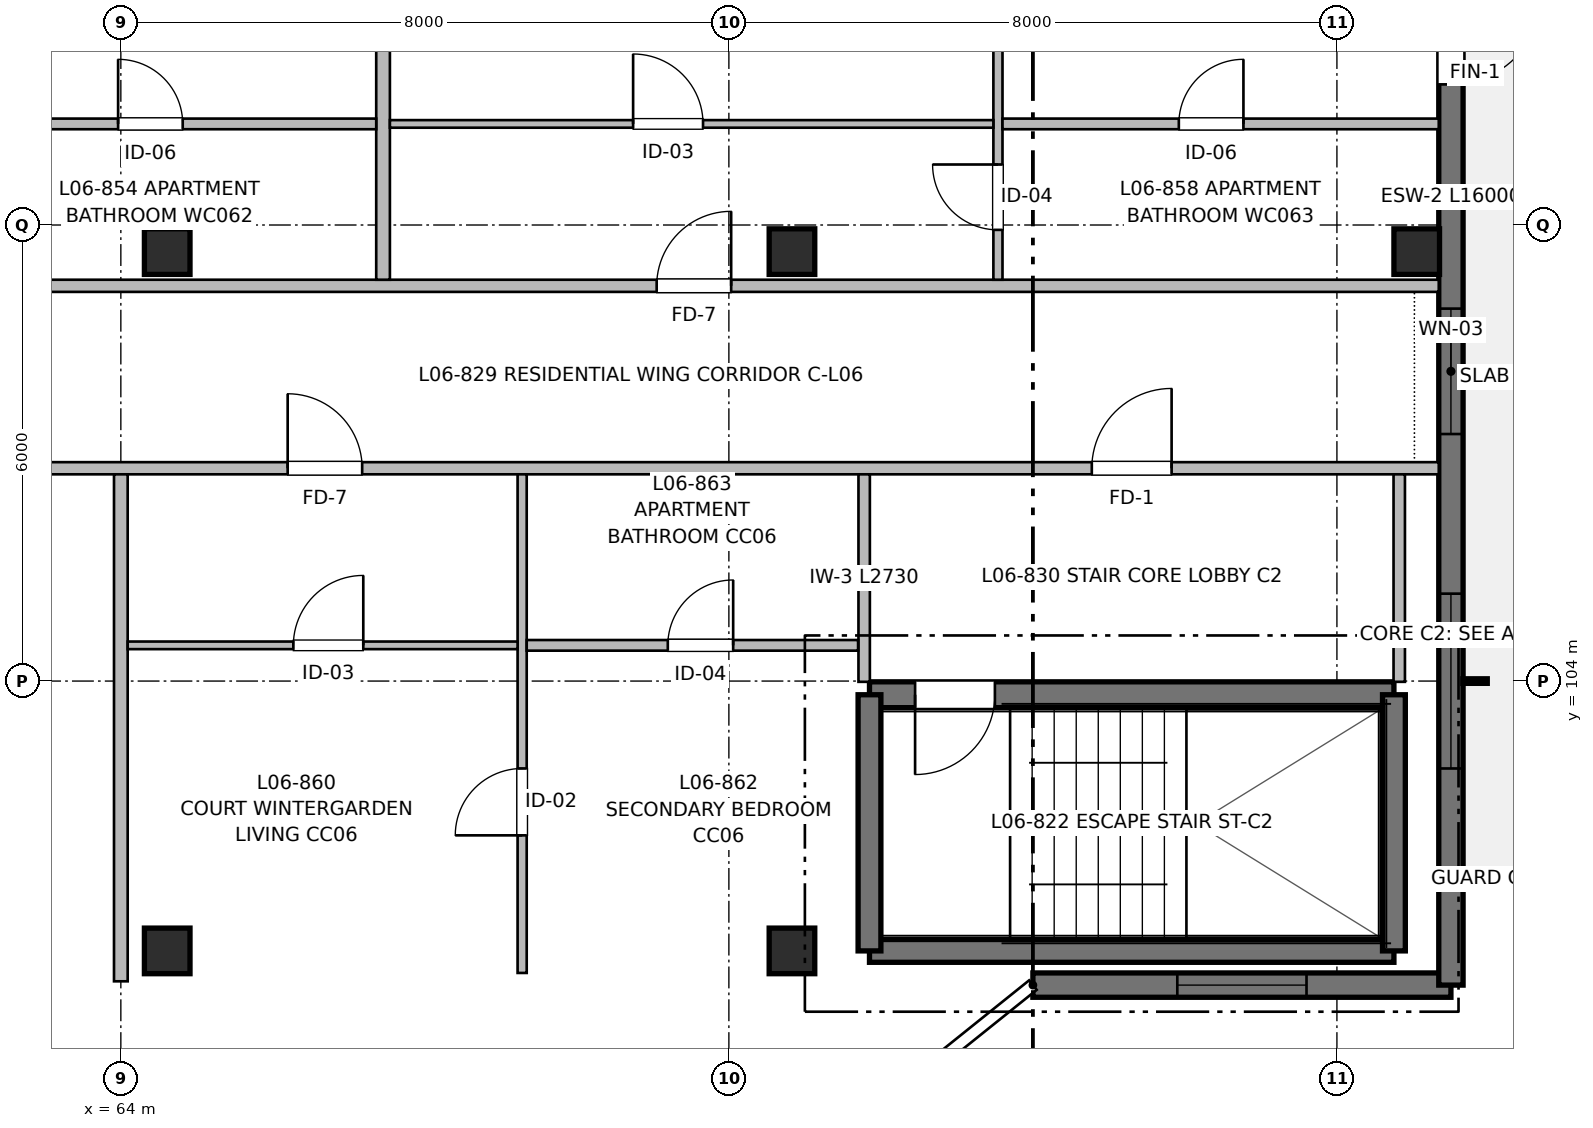
"""IFC4 building model, lengths in metres.
Left out: names, types, materials, properties, quantities, classifications, styles, units other than length and angle.
Written with IfcOpenShell. Run it as: python <this file> out.ifc"""

import sys

from ifc_helpers import new_model, si_unit, direction, frame, frame_2d, origin, origin_2d, place, context, subcontext, project, spatial, rectangle, extrude, element, fill, save


model = new_model("IFC4")
c1 = context("Model", 3, precision=1e-05, world=origin(), true_north=direction((0.0, 1.0)))
c2 = subcontext(c1, "Body", "Model", "MODEL_VIEW")
j1 = project(units=[si_unit("LENGTHUNIT", "METRE"), si_unit("PLANEANGLEUNIT", "RADIAN")], contexts=[c1])
p1 = place(None, origin())
s1 = spatial("IfcSite", under=j1, at=p1, CompositionType="ELEMENT")
p2 = place(p1, origin())
s2 = spatial("IfcBuilding", under=s1, at=p2, CompositionType="ELEMENT")
p3 = place(p2, frame((0.0, 0.0, 20.16)))
s3 = spatial("IfcBuildingStorey", under=s2, at=p3, CompositionType="ELEMENT", Elevation=20.16)
for number, where, z_axis, x_axis in (
    (1, (64.61, 100.45, 0.0), (0.0, 0.0, 1.0), (1.0, 0.0, 0.0)),
    (2, (64.61, 109.65, 0.0), (0.0, 0.0, 1.0), (1.0, 0.0, 0.0)),
    (3, (72.83, 100.45, 0.0), (0.0, 0.0, 1.0), (1.0, 0.0, 0.0)),
    (4, (72.83, 109.65, 0.0), (0.0, 0.0, 1.0), (1.0, 0.0, 0.0)),
    (5, (81.05, 109.65, 0.0), (0.0, 0.0, 1.0), (1.0, 0.0, 0.0)),
):
    element("IfcColumn", number, at=place(p3, frame(where, z_axis=z_axis, x_axis=x_axis)), inside=s3, PredefinedType="COLUMN", context=c2, shape_type="SweptSolid", body=[
        extrude(rectangle(XDim=0.6, YDim=0.6, at=origin_2d()), origin(), (0.0, 0.0, 1.0), 3.2),
    ])
p4 = place(p3, frame((73.85, 100.45, 0.0), z_axis=(0.0, 0.0, 1.0), x_axis=(1.0, 0.0, 0.0)))
e6 = element("IfcWall", 6, at=p4, inside=s3, PredefinedType="SHEAR", context=c2, shape_type="SweptSolid", body=[
    extrude(rectangle(XDim=6.9, YDim=0.3, at=frame_2d((3.45, 0.0))), origin(), (0.0, 0.0, 1.0), 3.2),
])
p5 = place(p3, frame((80.75, 103.82, 0.0), z_axis=(0.0, 0.0, 1.0), x_axis=(-1.0, 0.0, 0.0)))
e7 = element("IfcWall", 7, at=p5, inside=s3, PredefinedType="SHEAR", context=c2, shape_type="SweptSolid", body=[
    extrude(rectangle(XDim=6.9, YDim=0.34, at=frame_2d((3.45, 0.0))), origin(), (0.0, 0.0, 1.0), 3.2),
])
p6 = place(p5, frame((5.25, 0.0, 0.0)))
e8 = element("IfcOpeningElement", 8, at=p6, cuts=e7, PredefinedType="OPENING", context=c2, shape_type="SweptSolid", body=[
    extrude(rectangle(XDim=1.05, YDim=2.15, at=frame_2d((0.525, 1.075))), frame((0.0, 0.18, 0.0), z_axis=(0.0, -1.0, 0.0), x_axis=(1.0, 0.0, 0.0)), (0.0, 0.0, 1.0), 0.36),
])
for number, where, z_axis, x_axis in (
    (9, (73.85, 103.82, 0.0), (0.0, 0.0, 1.0), (0.0, -1.0, 0.0)),
    (10, (80.75, 100.45, 0.0), (0.0, 0.0, 1.0), (0.0, 1.0, 0.0)),
):
    element("IfcWall", number, at=place(p3, frame(where, z_axis=z_axis, x_axis=x_axis)), inside=s3, PredefinedType="SHEAR", context=c2, shape_type="SweptSolid", body=[
        extrude(rectangle(XDim=3.37, YDim=0.3, at=frame_2d((1.685, 0.0))), origin(), (0.0, 0.0, 1.0), 3.2),
    ])
p7 = place(p3, frame((81.5, 100.0, 0.0), z_axis=(0.0, 0.0, 1.0), x_axis=(-1.0, 0.0, 0.0)))
e11 = element("IfcWall", 11, at=p7, inside=s3, PredefinedType="SHEAR", context=c2, shape_type="SweptSolid", body=[
    extrude(rectangle(XDim=5.5, YDim=0.32, at=frame_2d((2.75, 0.0))), origin(), (0.0, 0.0, 1.0), 2.98),
])
p8 = place(p7, frame((1.9, 0.0, 0.72)))
e12 = element("IfcOpeningElement", 12, at=p8, cuts=e11, PredefinedType="OPENING", context=c2, shape_type="SweptSolid", body=[
    extrude(rectangle(XDim=1.7, YDim=1.5, at=frame_2d((0.85, 0.75))), frame((0.0, 0.17, 0.0), z_axis=(0.0, -1.0, 0.0), x_axis=(1.0, 0.0, 0.0)), (0.0, 0.0, 1.0), 0.34),
])
p9 = place(p3, frame((81.5, 116.0, 0.0), z_axis=(0.0, 0.0, 1.0), x_axis=(0.0, -1.0, 0.0)))
e13 = element("IfcWall", 13, at=p9, inside=s3, PredefinedType="SHEAR", context=c2, shape_type="SweptSolid", body=[
    extrude(rectangle(XDim=16.0, YDim=0.32, at=frame_2d((8.0, 0.0))), origin(), (0.0, 0.0, 1.0), 2.98),
])
p10 = place(p9, frame((2.95, 0.0, 0.0)))
e14 = element("IfcOpeningElement", 14, at=p10, cuts=e13, PredefinedType="OPENING", context=c2, shape_type="SweptSolid", body=[
    extrude(rectangle(XDim=1.2, YDim=2.2, at=frame_2d((0.6, 1.1))), frame((0.0, 0.17, 0.0), z_axis=(0.0, -1.0, 0.0), x_axis=(1.0, 0.0, 0.0)), (0.0, 0.0, 1.0), 0.34),
])
p11 = place(p9, frame((7.1, 0.0, 0.77)))
e15 = element("IfcOpeningElement", 15, at=p11, cuts=e13, PredefinedType="OPENING", context=c2, shape_type="SweptSolid", body=[
    extrude(rectangle(XDim=1.65, YDim=1.45, at=frame_2d((0.825, 0.725))), frame((0.0, 0.17, 0.0), z_axis=(0.0, -1.0, 0.0), x_axis=(1.0, 0.0, 0.0)), (0.0, 0.0, 1.0), 0.34),
])
p12 = place(p9, frame((10.85, 0.0, 0.57)))
e16 = element("IfcOpeningElement", 16, at=p12, cuts=e13, PredefinedType="OPENING", context=c2, shape_type="SweptSolid", body=[
    extrude(rectangle(XDim=2.3, YDim=1.65, at=frame_2d((1.15, 0.825))), frame((0.0, 0.17, 0.0), z_axis=(0.0, -1.0, 0.0), x_axis=(1.0, 0.0, 0.0)), (0.0, 0.0, 1.0), 0.34),
])
p13 = place(p3, frame((57.2, 106.8, 0.0), z_axis=(0.0, 0.0, 1.0), x_axis=(1.0, 0.0, 0.0)))
e17 = element("IfcWall", 17, at=p13, inside=s3, PredefinedType="PARTITIONING", context=c2, shape_type="SweptSolid", body=[
    extrude(rectangle(XDim=24.14, YDim=0.16, at=frame_2d((12.07, 0.0))), origin(), (0.0, 0.0, 1.0), 2.935),
])
p14 = place(p13, frame((19.575, 0.0, 0.0)))
e18 = element("IfcOpeningElement", 18, at=p14, cuts=e17, PredefinedType="OPENING", context=c2, shape_type="SweptSolid", body=[
    extrude(rectangle(XDim=1.05, YDim=2.15, at=frame_2d((0.525, 1.075))), frame((0.0, 0.09, 0.0), z_axis=(0.0, -1.0, 0.0), x_axis=(1.0, 0.0, 0.0)), (0.0, 0.0, 1.0), 0.18),
])
p15 = place(p13, frame((8.995, 0.0, 0.0)))
e19 = element("IfcOpeningElement", 19, at=p15, cuts=e17, PredefinedType="OPENING", context=c2, shape_type="SweptSolid", body=[
    extrude(rectangle(XDim=0.98, YDim=2.15, at=frame_2d((0.49, 1.075))), frame((0.0, 0.09, 0.0), z_axis=(0.0, -1.0, 0.0), x_axis=(1.0, 0.0, 0.0)), (0.0, 0.0, 1.0), 0.18),
])
p16 = place(p3, frame((39.66, 109.2, 0.0), z_axis=(0.0, 0.0, 1.0), x_axis=(1.0, 0.0, 0.0)))
e20 = element("IfcWall", 20, at=p16, inside=s3, PredefinedType="PARTITIONING", context=c2, shape_type="SweptSolid", body=[
    extrude(rectangle(XDim=41.68, YDim=0.16, at=frame_2d((20.84, 0.0))), origin(), (0.0, 0.0, 1.0), 2.935),
])
p17 = place(p16, frame((3.51, 0.0, 0.0)))
e21 = element("IfcOpeningElement", 21, at=p17, cuts=e20, PredefinedType="OPENING", context=c2, shape_type="SweptSolid", body=[
    extrude(rectangle(XDim=0.98, YDim=2.15, at=frame_2d((0.49, 1.075))), frame((0.0, 0.09, 0.0), z_axis=(0.0, -1.0, 0.0), x_axis=(1.0, 0.0, 0.0)), (0.0, 0.0, 1.0), 0.18),
])
p18 = place(p16, frame((17.47, 0.0, 0.0)))
e22 = element("IfcOpeningElement", 22, at=p18, cuts=e20, PredefinedType="OPENING", context=c2, shape_type="SweptSolid", body=[
    extrude(rectangle(XDim=0.98, YDim=2.15, at=frame_2d((0.49, 1.075))), frame((0.0, 0.09, 0.0), z_axis=(0.0, -1.0, 0.0), x_axis=(1.0, 0.0, 0.0)), (0.0, 0.0, 1.0), 0.18),
])
p19 = place(p16, frame((31.39, 0.0, 0.0)))
e23 = element("IfcOpeningElement", 23, at=p19, cuts=e20, PredefinedType="OPENING", context=c2, shape_type="SweptSolid", body=[
    extrude(rectangle(XDim=0.98, YDim=2.15, at=frame_2d((0.49, 1.075))), frame((0.0, 0.09, 0.0), z_axis=(0.0, -1.0, 0.0), x_axis=(1.0, 0.0, 0.0)), (0.0, 0.0, 1.0), 0.18),
])
p20 = place(p3, frame((64.0, 100.05, 0.0), z_axis=(0.0, 0.0, 1.0), x_axis=(0.0, 1.0, 0.0)))
e24 = element("IfcWall", 24, at=p20, inside=s3, PredefinedType="PARTITIONING", context=c2, shape_type="SweptSolid", body=[
    extrude(rectangle(XDim=6.67, YDim=0.18, at=frame_2d((3.335, 0.0))), origin(), (0.0, 0.0, 1.0), 2.935),
])
for number, where, z_axis, x_axis in (
    (25, (73.78, 103.99, 0.0), (0.0, 0.0, 1.0), (0.0, 1.0, 0.0)),
    (26, (80.82, 103.99, 0.0), (0.0, 0.0, 1.0), (0.0, 1.0, 0.0)),
):
    element("IfcWall", number, at=place(p3, frame(where, z_axis=z_axis, x_axis=x_axis)), inside=s3, PredefinedType="PARTITIONING", context=c2, shape_type="SweptSolid", body=[
        extrude(rectangle(XDim=2.73, YDim=0.15, at=frame_2d((1.365, 0.0))), origin(), (0.0, 0.0, 1.0), 2.935),
    ])
p21 = place(p3, frame((67.45, 109.28, 0.0), z_axis=(0.0, 0.0, 1.0), x_axis=(0.0, 1.0, 0.0)))
e27 = element("IfcWall", 27, at=p21, inside=s3, PredefinedType="PARTITIONING", context=c2, shape_type="SweptSolid", body=[
    extrude(rectangle(XDim=6.6, YDim=0.18, at=frame_2d((3.3, 0.0))), origin(), (0.0, 0.0, 1.0), 2.935),
])
p22 = place(p3, frame((61.66, 111.33, 0.0), z_axis=(0.0, 0.0, 1.0), x_axis=(1.0, 0.0, 0.0)))
e28 = element("IfcWall", 28, at=p22, inside=s3, PredefinedType="PARTITIONING", context=c2, shape_type="SweptSolid", body=[
    extrude(rectangle(XDim=5.7, YDim=0.14, at=frame_2d((2.85, 0.0))), origin(), (0.0, 0.0, 1.0), 2.935),
])
p23 = place(p22, frame((2.304, 0.0, 0.0)))
e29 = element("IfcOpeningElement", 29, at=p23, cuts=e28, PredefinedType="OPENING", context=c2, shape_type="SweptSolid", body=[
    extrude(rectangle(XDim=0.85, YDim=2.05, at=frame_2d((0.425, 1.025))), frame((0.0, 0.08, 0.0), z_axis=(0.0, -1.0, 0.0), x_axis=(1.0, 0.0, 0.0)), (0.0, 0.0, 1.0), 0.16),
])
p24 = place(p3, frame((75.54, 109.28, 0.0), z_axis=(0.0, 0.0, 1.0), x_axis=(0.0, 1.0, 0.0)))
e30 = element("IfcWall", 30, at=p24, inside=s3, PredefinedType="PARTITIONING", context=c2, shape_type="SweptSolid", body=[
    extrude(rectangle(XDim=6.6, YDim=0.12, at=frame_2d((3.3, 0.0))), origin(), (0.0, 0.0, 1.0), 2.935),
])
p25 = place(p24, frame((0.656, 0.0, 0.0)))
e31 = element("IfcOpeningElement", 31, at=p25, cuts=e30, PredefinedType="OPENING", context=c2, shape_type="SweptSolid", body=[
    extrude(rectangle(XDim=0.86, YDim=2.1, at=frame_2d((0.43, 1.05))), frame((0.0, 0.07, 0.0), z_axis=(0.0, -1.0, 0.0), x_axis=(1.0, 0.0, 0.0)), (0.0, 0.0, 1.0), 0.14),
])
p26 = place(p24, frame((4.097, 0.0, 0.0)))
e32 = element("IfcOpeningElement", 32, at=p26, cuts=e30, PredefinedType="OPENING", context=c2, shape_type="SweptSolid", body=[
    extrude(rectangle(XDim=0.9, YDim=2.1, at=frame_2d((0.45, 1.05))), frame((0.0, 0.07, 0.0), z_axis=(0.0, -1.0, 0.0), x_axis=(1.0, 0.0, 0.0)), (0.0, 0.0, 1.0), 0.14),
])
p27 = place(p3, frame((75.6, 111.33, 0.0), z_axis=(0.0, 0.0, 1.0), x_axis=(1.0, 0.0, 0.0)))
e33 = element("IfcWall", 33, at=p27, inside=s3, PredefinedType="PARTITIONING", context=c2, shape_type="SweptSolid", body=[
    extrude(rectangle(XDim=5.74, YDim=0.14, at=frame_2d((2.87, 0.0))), origin(), (0.0, 0.0, 1.0), 2.935),
])
p28 = place(p27, frame((2.32, 0.0, 0.0)))
e34 = element("IfcOpeningElement", 34, at=p28, cuts=e33, PredefinedType="OPENING", context=c2, shape_type="SweptSolid", body=[
    extrude(rectangle(XDim=0.85, YDim=2.05, at=frame_2d((0.425, 1.025))), frame((0.0, 0.08, 0.0), z_axis=(0.0, -1.0, 0.0), x_axis=(1.0, 0.0, 0.0)), (0.0, 0.0, 1.0), 0.16),
])
p29 = place(p3, frame((67.54, 111.33, 0.0), z_axis=(0.0, 0.0, 1.0), x_axis=(1.0, 0.0, 0.0)))
e35 = element("IfcWall", 35, at=p29, inside=s3, PredefinedType="PARTITIONING", context=c2, shape_type="SweptSolid", body=[
    extrude(rectangle(XDim=7.94, YDim=0.1, at=frame_2d((3.97, 0.0))), origin(), (0.0, 0.0, 1.0), 2.935),
])
p30 = place(p29, frame((3.2, 0.0, 0.0)))
e36 = element("IfcOpeningElement", 36, at=p30, cuts=e35, PredefinedType="OPENING", context=c2, shape_type="SweptSolid", body=[
    extrude(rectangle(XDim=0.92, YDim=2.1, at=frame_2d((0.46, 1.05))), frame((0.0, 0.06, 0.0), z_axis=(0.0, -1.0, 0.0), x_axis=(1.0, 0.0, 0.0)), (0.0, 0.0, 1.0), 0.12),
])
p31 = place(p3, frame((69.28, 100.16, 0.0), z_axis=(0.0, 0.0, 1.0), x_axis=(0.0, 1.0, 0.0)))
e37 = element("IfcWall", 37, at=p31, inside=s3, PredefinedType="PARTITIONING", context=c2, shape_type="SweptSolid", body=[
    extrude(rectangle(XDim=6.56, YDim=0.12, at=frame_2d((3.28, 0.0))), origin(), (0.0, 0.0, 1.0), 2.935),
])
p32 = place(p31, frame((1.81, 0.0, 0.0)))
e38 = element("IfcOpeningElement", 38, at=p32, cuts=e37, PredefinedType="OPENING", context=c2, shape_type="SweptSolid", body=[
    extrude(rectangle(XDim=0.88, YDim=2.1, at=frame_2d((0.44, 1.05))), frame((0.0, 0.07, 0.0), z_axis=(0.0, -1.0, 0.0), x_axis=(1.0, 0.0, 0.0)), (0.0, 0.0, 1.0), 0.14),
])
p33 = place(p3, frame((69.34, 104.47, 0.0), z_axis=(0.0, 0.0, 1.0), x_axis=(1.0, 0.0, 0.0)))
e39 = element("IfcWall", 39, at=p33, inside=s3, PredefinedType="PARTITIONING", context=c2, shape_type="SweptSolid", body=[
    extrude(rectangle(XDim=4.36, YDim=0.14, at=frame_2d((2.18, 0.0))), origin(), (0.0, 0.0, 1.0), 2.935),
])
p34 = place(p33, frame((1.856, 0.0, 0.0)))
e40 = element("IfcOpeningElement", 40, at=p34, cuts=e39, PredefinedType="OPENING", context=c2, shape_type="SweptSolid", body=[
    extrude(rectangle(XDim=0.86, YDim=2.1, at=frame_2d((0.43, 1.05))), frame((0.0, 0.08, 0.0), z_axis=(0.0, -1.0, 0.0), x_axis=(1.0, 0.0, 0.0)), (0.0, 0.0, 1.0), 0.16),
])
p35 = place(p3, frame((64.09, 104.47, 0.0), z_axis=(0.0, 0.0, 1.0), x_axis=(1.0, 0.0, 0.0)))
e41 = element("IfcWall", 41, at=p35, inside=s3, PredefinedType="PARTITIONING", context=c2, shape_type="SweptSolid", body=[
    extrude(rectangle(XDim=5.13, YDim=0.1, at=frame_2d((2.565, 0.0))), origin(), (0.0, 0.0, 1.0), 2.935),
])
p36 = place(p35, frame((2.18, 0.0, 0.0)))
e42 = element("IfcOpeningElement", 42, at=p36, cuts=e41, PredefinedType="OPENING", context=c2, shape_type="SweptSolid", body=[
    extrude(rectangle(XDim=0.92, YDim=2.1, at=frame_2d((0.46, 1.05))), frame((0.0, 0.06, 0.0), z_axis=(0.0, -1.0, 0.0), x_axis=(1.0, 0.0, 0.0)), (0.0, 0.0, 1.0), 0.12),
])
p37 = place(p6, origin())
e43 = element("IfcDoor", 43, at=p37, inside=s3, OperationType="SINGLE_SWING_RIGHT", PredefinedType="DOOR", context=c2, shape_type="SweptSolid", body=[
    extrude(rectangle(XDim=1.05, YDim=2.15, at=frame_2d((0.525, 1.075))), frame((0.0, 0.025, 0.0), z_axis=(0.0, -1.0, 0.0), x_axis=(1.0, 0.0, 0.0)), (0.0, 0.0, 1.0), 0.05),
])
fill(e8, e43)
p38 = place(p8, origin())
e44 = element("IfcWindow", 44, at=p38, inside=s3, PartitioningType="SINGLE_PANEL", PredefinedType="WINDOW", context=c2, shape_type="SweptSolid", body=[
    extrude(rectangle(XDim=1.7, YDim=1.5, at=frame_2d((0.85, 0.75))), frame((0.0, 0.03, 0.0), z_axis=(0.0, -1.0, 0.0), x_axis=(1.0, 0.0, 0.0)), (0.0, 0.0, 1.0), 0.06),
])
fill(e12, e44)
p39 = place(p10, origin())
e45 = element("IfcDoor", 45, at=p39, inside=s3, OperationType="SINGLE_SWING_LEFT", PredefinedType="DOOR", context=c2, shape_type="SweptSolid", body=[
    extrude(rectangle(XDim=1.2, YDim=2.2, at=frame_2d((0.6, 1.1))), frame((0.0, 0.025, 0.0), z_axis=(0.0, -1.0, 0.0), x_axis=(1.0, 0.0, 0.0)), (0.0, 0.0, 1.0), 0.05),
])
fill(e14, e45)
p40 = place(p11, origin())
e46 = element("IfcWindow", 46, at=p40, inside=s3, PartitioningType="SINGLE_PANEL", PredefinedType="WINDOW", context=c2, shape_type="SweptSolid", body=[
    extrude(rectangle(XDim=1.65, YDim=1.45, at=frame_2d((0.825, 0.725))), frame((0.0, 0.03, 0.0), z_axis=(0.0, -1.0, 0.0), x_axis=(1.0, 0.0, 0.0)), (0.0, 0.0, 1.0), 0.06),
])
fill(e15, e46)
p41 = place(p12, origin())
e47 = element("IfcWindow", 47, at=p41, inside=s3, PartitioningType="SINGLE_PANEL", PredefinedType="WINDOW", context=c2, shape_type="SweptSolid", body=[
    extrude(rectangle(XDim=2.3, YDim=1.65, at=frame_2d((1.15, 0.825))), frame((0.0, 0.03, 0.0), z_axis=(0.0, -1.0, 0.0), x_axis=(1.0, 0.0, 0.0)), (0.0, 0.0, 1.0), 0.06),
])
fill(e16, e47)
p42 = place(p14, origin())
e48 = element("IfcDoor", 48, at=p42, inside=s3, OperationType="SINGLE_SWING_RIGHT", PredefinedType="DOOR", context=c2, shape_type="SweptSolid", body=[
    extrude(rectangle(XDim=1.05, YDim=2.15, at=frame_2d((0.525, 1.075))), frame((0.0, 0.025, 0.0), z_axis=(0.0, -1.0, 0.0), x_axis=(1.0, 0.0, 0.0)), (0.0, 0.0, 1.0), 0.05),
])
fill(e18, e48)
p43 = place(p23, origin())
e49 = element("IfcDoor", 49, at=p43, inside=s3, OperationType="SINGLE_SWING_LEFT", PredefinedType="DOOR", context=c2, shape_type="SweptSolid", body=[
    extrude(rectangle(XDim=0.85, YDim=2.05, at=frame_2d((0.425, 1.025))), frame((0.0, 0.025, 0.0), z_axis=(0.0, -1.0, 0.0), x_axis=(1.0, 0.0, 0.0)), (0.0, 0.0, 1.0), 0.05),
])
fill(e29, e49)
p44 = place(p19, origin())
e50 = element("IfcDoor", 50, at=p44, inside=s3, OperationType="SINGLE_SWING_RIGHT", PredefinedType="DOOR", context=c2, shape_type="SweptSolid", body=[
    extrude(rectangle(XDim=0.98, YDim=2.15, at=frame_2d((0.49, 1.075))), frame((0.0, 0.025, 0.0), z_axis=(0.0, -1.0, 0.0), x_axis=(1.0, 0.0, 0.0)), (0.0, 0.0, 1.0), 0.05),
])
fill(e23, e50)
p45 = place(p30, origin())
e51 = element("IfcDoor", 51, at=p45, inside=s3, OperationType="SINGLE_SWING_LEFT", PredefinedType="DOOR", context=c2, shape_type="SweptSolid", body=[
    extrude(rectangle(XDim=0.92, YDim=2.1, at=frame_2d((0.46, 1.05))), frame((0.0, 0.025, 0.0), z_axis=(0.0, -1.0, 0.0), x_axis=(1.0, 0.0, 0.0)), (0.0, 0.0, 1.0), 0.05),
])
fill(e36, e51)
p46 = place(p25, origin())
e52 = element("IfcDoor", 52, at=p46, inside=s3, OperationType="SINGLE_SWING_RIGHT", PredefinedType="DOOR", context=c2, shape_type="SweptSolid", body=[
    extrude(rectangle(XDim=0.86, YDim=2.1, at=frame_2d((0.43, 1.05))), frame((0.0, 0.025, 0.0), z_axis=(0.0, -1.0, 0.0), x_axis=(1.0, 0.0, 0.0)), (0.0, 0.0, 1.0), 0.05),
])
fill(e31, e52)
p47 = place(p28, origin())
e53 = element("IfcDoor", 53, at=p47, inside=s3, OperationType="SINGLE_SWING_RIGHT", PredefinedType="DOOR", context=c2, shape_type="SweptSolid", body=[
    extrude(rectangle(XDim=0.85, YDim=2.05, at=frame_2d((0.425, 1.025))), frame((0.0, 0.025, 0.0), z_axis=(0.0, -1.0, 0.0), x_axis=(1.0, 0.0, 0.0)), (0.0, 0.0, 1.0), 0.05),
])
fill(e34, e53)
p48 = place(p15, origin())
e54 = element("IfcDoor", 54, at=p48, inside=s3, OperationType="SINGLE_SWING_LEFT", PredefinedType="DOOR", context=c2, shape_type="SweptSolid", body=[
    extrude(rectangle(XDim=0.98, YDim=2.15, at=frame_2d((0.49, 1.075))), frame((0.0, 0.025, 0.0), z_axis=(0.0, -1.0, 0.0), x_axis=(1.0, 0.0, 0.0)), (0.0, 0.0, 1.0), 0.05),
])
fill(e19, e54)
p49 = place(p36, origin())
e55 = element("IfcDoor", 55, at=p49, inside=s3, OperationType="SINGLE_SWING_RIGHT", PredefinedType="DOOR", context=c2, shape_type="SweptSolid", body=[
    extrude(rectangle(XDim=0.92, YDim=2.1, at=frame_2d((0.46, 1.05))), frame((0.0, 0.025, 0.0), z_axis=(0.0, -1.0, 0.0), x_axis=(1.0, 0.0, 0.0)), (0.0, 0.0, 1.0), 0.05),
])
fill(e42, e55)
p50 = place(p32, origin())
e56 = element("IfcDoor", 56, at=p50, inside=s3, OperationType="SINGLE_SWING_LEFT", PredefinedType="DOOR", context=c2, shape_type="SweptSolid", body=[
    extrude(rectangle(XDim=0.88, YDim=2.1, at=frame_2d((0.44, 1.05))), frame((0.0, 0.025, 0.0), z_axis=(0.0, -1.0, 0.0), x_axis=(1.0, 0.0, 0.0)), (0.0, 0.0, 1.0), 0.05),
])
fill(e38, e56)
p51 = place(p34, origin())
e57 = element("IfcDoor", 57, at=p51, inside=s3, OperationType="SINGLE_SWING_RIGHT", PredefinedType="DOOR", context=c2, shape_type="SweptSolid", body=[
    extrude(rectangle(XDim=0.86, YDim=2.1, at=frame_2d((0.43, 1.05))), frame((0.0, 0.025, 0.0), z_axis=(0.0, -1.0, 0.0), x_axis=(1.0, 0.0, 0.0)), (0.0, 0.0, 1.0), 0.05),
])
fill(e40, e57)
save(model, sys.argv[1])
